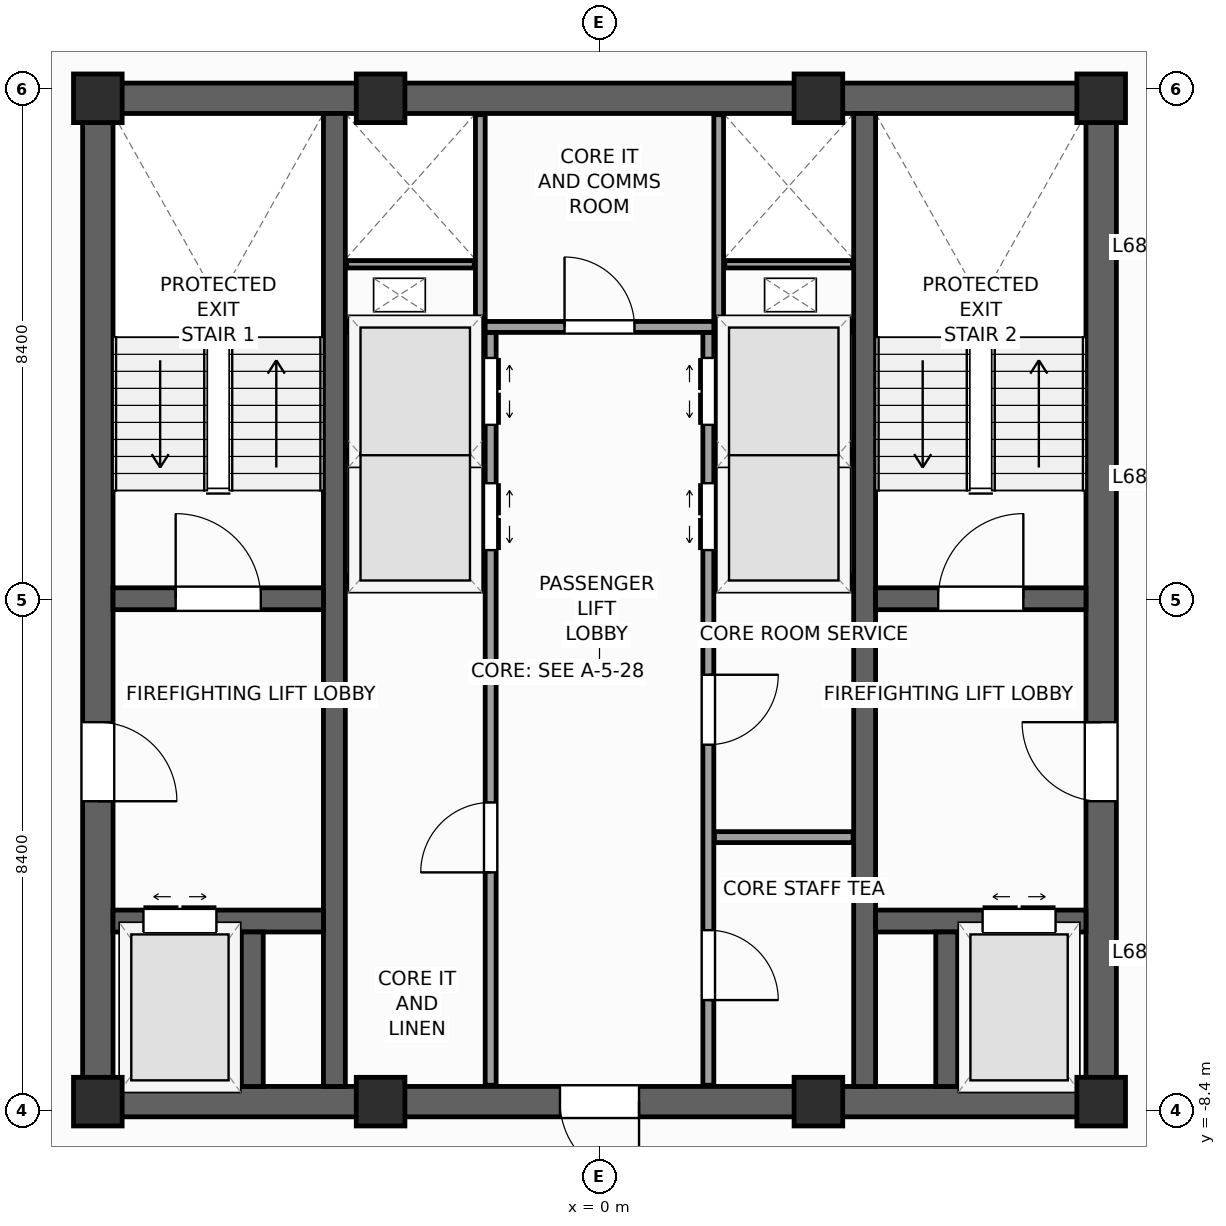
"""IFC4 building model, lengths in metres.
Left out: names, types, materials, properties, quantities, classifications, styles, units other than length and angle.
Written with IfcOpenShell. Run it as: python <this file> out.ifc"""

import sys

from ifc_helpers import new_model, si_unit, direction, frame, frame_2d, origin, origin_2d, place, context, subcontext, project, spatial, rectangle, extrude, source, transform, mapped, element, fill, save


model = new_model("IFC4")
c1 = context("Model", 3, precision=1e-05, world=origin(), true_north=direction((0.0, 1.0)))
c2 = subcontext(c1, "Body", "Model", "MODEL_VIEW")
j1 = project(units=[si_unit("LENGTHUNIT", "METRE"), si_unit("PLANEANGLEUNIT", "RADIAN")], contexts=[c1])
p1 = place(None, origin())
s1 = spatial("IfcSite", under=j1, at=p1, CompositionType="ELEMENT")
p2 = place(p1, origin())
s2 = spatial("IfcBuilding", under=s1, at=p2, CompositionType="ELEMENT")
p3 = place(p2, frame((0.0, 0.0, 279.6)))
s3 = spatial("IfcBuildingStorey", under=s2, at=p3, CompositionType="ELEMENT", Elevation=279.6)
p4 = place(p3, frame((-8.5, -8.25, 0.0), z_axis=(0.0, 0.0, 1.0), x_axis=(1.0, 0.0, 0.0)))
e1 = element("IfcWall", 1, at=p4, inside=s3, PredefinedType="SHEAR", context=c2, shape_type="SweptSolid", body=[
    extrude(rectangle(XDim=17.0, YDim=0.5, at=frame_2d((8.5, 0.0))), origin(), (0.0, 0.0, 1.0), 3.6),
])
p5 = place(p4, frame((7.85, 0.0, 0.0)))
e2 = element("IfcOpeningElement", 2, at=p5, cuts=e1, PredefinedType="OPENING", context=c2, shape_type="SweptSolid", body=[
    extrude(rectangle(XDim=1.3, YDim=2.2, at=frame_2d((0.65, 1.1))), frame((0.0, 0.26, 0.0), z_axis=(0.0, -1.0, 0.0), x_axis=(1.0, 0.0, 0.0)), (0.0, 0.0, 1.0), 0.52),
])
p6 = place(p3, frame((-8.5, 8.25, 0.0), z_axis=(0.0, 0.0, 1.0), x_axis=(1.0, 0.0, 0.0)))
e3 = element("IfcWall", 3, at=p6, inside=s3, PredefinedType="SHEAR", context=c2, shape_type="SweptSolid", body=[
    extrude(rectangle(XDim=17.0, YDim=0.5, at=frame_2d((8.5, 0.0))), origin(), (0.0, 0.0, 1.0), 3.6),
])
p7 = place(p3, frame((-8.25, -8.0, 0.0), z_axis=(0.0, 0.0, 1.0), x_axis=(0.0, 1.0, 0.0)))
e4 = element("IfcWall", 4, at=p7, inside=s3, PredefinedType="SHEAR", context=c2, shape_type="SweptSolid", body=[
    extrude(rectangle(XDim=16.0, YDim=0.5, at=frame_2d((8.0, 0.0))), origin(), (0.0, 0.0, 1.0), 3.6),
])
p8 = place(p7, frame((4.69, 0.0, 0.0)))
e5 = element("IfcOpeningElement", 5, at=p8, cuts=e4, PredefinedType="OPENING", context=c2, shape_type="SweptSolid", body=[
    extrude(rectangle(XDim=1.3, YDim=2.2, at=frame_2d((0.65, 1.1))), frame((0.0, 0.26, 0.0), z_axis=(0.0, -1.0, 0.0), x_axis=(1.0, 0.0, 0.0)), (0.0, 0.0, 1.0), 0.52),
])
p9 = place(p3, frame((8.25, -8.0, 0.0), z_axis=(0.0, 0.0, 1.0), x_axis=(0.0, 1.0, 0.0)))
e6 = element("IfcWall", 6, at=p9, inside=s3, PredefinedType="SHEAR", context=c2, shape_type="SweptSolid", body=[
    extrude(rectangle(XDim=16.0, YDim=0.5, at=frame_2d((8.0, 0.0))), origin(), (0.0, 0.0, 1.0), 3.6),
])
p10 = place(p9, frame((4.69, 0.0, 0.0)))
e7 = element("IfcOpeningElement", 7, at=p10, cuts=e6, PredefinedType="OPENING", context=c2, shape_type="SweptSolid", body=[
    extrude(rectangle(XDim=1.3, YDim=2.2, at=frame_2d((0.65, 1.1))), frame((0.0, 0.26, 0.0), z_axis=(0.0, -1.0, 0.0), x_axis=(1.0, 0.0, 0.0)), (0.0, 0.0, 1.0), 0.52),
])
for number, where, z_axis, x_axis in (
    (8, (-4.36, -8.0, 0.0), (0.0, 0.0, 1.0), (0.0, 1.0, 0.0)),
    (9, (4.36, -8.0, 0.0), (0.0, 0.0, 1.0), (0.0, 1.0, 0.0)),
):
    element("IfcWall", number, at=place(p3, frame(where, z_axis=z_axis, x_axis=x_axis)), inside=s3, PredefinedType="SHEAR", context=c2, shape_type="SweptSolid", body=[
        extrude(rectangle(XDim=16.0, YDim=0.36, at=frame_2d((8.0, 0.0))), origin(), (0.0, 0.0, 1.0), 3.6),
    ])
p11 = place(p3, frame((-8.0, 0.02, 0.0), z_axis=(0.0, 0.0, 1.0), x_axis=(1.0, 0.0, 0.0)))
e10 = element("IfcWall", 10, at=p11, inside=s3, PredefinedType="SHEAR", context=c2, shape_type="SweptSolid", body=[
    extrude(rectangle(XDim=3.46, YDim=0.36, at=frame_2d((1.73, 0.0))), origin(), (0.0, 0.0, 1.0), 3.6),
])
p12 = place(p11, frame((1.03, 0.0, 0.0)))
e11 = element("IfcOpeningElement", 11, at=p12, cuts=e10, PredefinedType="OPENING", context=c2, shape_type="SweptSolid", body=[
    extrude(rectangle(XDim=1.4, YDim=2.2, at=frame_2d((0.7, 1.1))), frame((0.0, 0.19, 0.0), z_axis=(0.0, -1.0, 0.0), x_axis=(1.0, 0.0, 0.0)), (0.0, 0.0, 1.0), 0.38),
])
p13 = place(p3, frame((4.54, 0.02, 0.0), z_axis=(0.0, 0.0, 1.0), x_axis=(1.0, 0.0, 0.0)))
e12 = element("IfcWall", 12, at=p13, inside=s3, PredefinedType="SHEAR", context=c2, shape_type="SweptSolid", body=[
    extrude(rectangle(XDim=3.46, YDim=0.36, at=frame_2d((1.73, 0.0))), origin(), (0.0, 0.0, 1.0), 3.6),
])
p14 = place(p13, frame((1.03, 0.0, 0.0)))
e13 = element("IfcOpeningElement", 13, at=p14, cuts=e12, PredefinedType="OPENING", context=c2, shape_type="SweptSolid", body=[
    extrude(rectangle(XDim=1.4, YDim=2.2, at=frame_2d((0.7, 1.1))), frame((0.0, 0.19, 0.0), z_axis=(0.0, -1.0, 0.0), x_axis=(1.0, 0.0, 0.0)), (0.0, 0.0, 1.0), 0.38),
])
p15 = place(p3, frame((-8.0, -5.28, 0.0), z_axis=(0.0, 0.0, 1.0), x_axis=(1.0, 0.0, 0.0)))
e14 = element("IfcWall", 14, at=p15, inside=s3, PredefinedType="SHEAR", context=c2, shape_type="SweptSolid", body=[
    extrude(rectangle(XDim=3.46, YDim=0.36, at=frame_2d((1.73, 0.0))), origin(), (0.0, 0.0, 1.0), 3.6),
])
p16 = place(p15, frame((0.5, 0.0, 0.0)))
e15 = element("IfcOpeningElement", 15, at=p16, cuts=e14, PredefinedType="OPENING", context=c2, shape_type="SweptSolid", body=[
    extrude(rectangle(XDim=1.2, YDim=2.25, at=frame_2d((0.6, 1.125))), frame((0.0, 0.19, 0.0), z_axis=(0.0, -1.0, 0.0), x_axis=(1.0, 0.0, 0.0)), (0.0, 0.0, 1.0), 0.38),
])
p17 = place(p3, frame((4.54, -5.28, 0.0), z_axis=(0.0, 0.0, 1.0), x_axis=(1.0, 0.0, 0.0)))
e16 = element("IfcWall", 16, at=p17, inside=s3, PredefinedType="SHEAR", context=c2, shape_type="SweptSolid", body=[
    extrude(rectangle(XDim=3.46, YDim=0.36, at=frame_2d((1.73, 0.0))), origin(), (0.0, 0.0, 1.0), 3.6),
])
p18 = place(p17, frame((1.76, 0.0, 0.0)))
e17 = element("IfcOpeningElement", 17, at=p18, cuts=e16, PredefinedType="OPENING", context=c2, shape_type="SweptSolid", body=[
    extrude(rectangle(XDim=1.2, YDim=2.25, at=frame_2d((0.6, 1.125))), frame((0.0, 0.19, 0.0), z_axis=(0.0, -1.0, 0.0), x_axis=(1.0, 0.0, 0.0)), (0.0, 0.0, 1.0), 0.38),
])
for number, where, z_axis, x_axis in (
    (18, (-5.71, -8.0, 0.0), (0.0, 0.0, 1.0), (0.0, 1.0, 0.0)),
    (19, (5.71, -8.0, 0.0), (0.0, 0.0, 1.0), (0.0, 1.0, 0.0)),
):
    element("IfcWall", number, at=place(p3, frame(where, z_axis=z_axis, x_axis=x_axis)), inside=s3, PredefinedType="SHEAR", context=c2, shape_type="SweptSolid", body=[
        extrude(rectangle(XDim=2.54, YDim=0.36, at=frame_2d((1.27, 0.0))), origin(), (0.0, 0.0, 1.0), 3.6),
    ])
m1 = source(origin(), c2, "Body", "SweptSolid", [
    extrude(rectangle(XDim=0.8, YDim=0.8, at=origin_2d()), origin(), (0.0, 0.0, 1.0), 3.6),
])
for number, where, z_axis, x_axis in (
    (20, (-8.25, -8.25, 0.0), (0.0, 0.0, 1.0), (1.0, 0.0, 0.0)),
    (21, (8.25, -8.25, 0.0), (0.0, 0.0, 1.0), (1.0, 0.0, 0.0)),
    (22, (8.25, 8.25, 0.0), (0.0, 0.0, 1.0), (1.0, 0.0, 0.0)),
    (23, (-8.25, 8.25, 0.0), (0.0, 0.0, 1.0), (1.0, 0.0, 0.0)),
    (24, (-3.6, -8.25, 0.0), (0.0, 0.0, 1.0), (1.0, 0.0, 0.0)),
    (25, (3.6, -8.25, 0.0), (0.0, 0.0, 1.0), (1.0, 0.0, 0.0)),
    (26, (-3.6, 8.25, 0.0), (0.0, 0.0, 1.0), (1.0, 0.0, 0.0)),
    (27, (3.6, 8.25, 0.0), (0.0, 0.0, 1.0), (1.0, 0.0, 0.0)),
):
    element("IfcColumn", number, at=place(p3, frame(where, z_axis=z_axis, x_axis=x_axis)), inside=s3, PredefinedType="PILASTER", context=c2, shape_type="MappedRepresentation", body=[
        mapped(m1, transform((0.0, 0.0, 0.0), scale=1.0)),
    ])
p19 = place(p3, frame((-1.79, -7.98, 0.0), z_axis=(0.0, 0.0, 1.0), x_axis=(0.0, 1.0, 0.0)))
e28 = element("IfcWall", 28, at=p19, inside=s3, PredefinedType="PARTITIONING", context=c2, shape_type="SweptSolid", body=[
    extrude(rectangle(XDim=12.38, YDim=0.18, at=frame_2d((6.19, 0.0))), origin(), (0.0, 0.0, 1.0), 3.35),
])
p20 = place(p19, frame((8.8, 0.0, 0.0)))
e29 = element("IfcOpeningElement", 29, at=p20, cuts=e28, PredefinedType="OPENING", context=c2, shape_type="SweptSolid", body=[
    extrude(rectangle(XDim=1.1, YDim=2.2, at=frame_2d((0.55, 1.1))), frame((0.0, 0.1, 0.0), z_axis=(0.0, -1.0, 0.0), x_axis=(1.0, 0.0, 0.0)), (0.0, 0.0, 1.0), 0.2),
])
p21 = place(p19, frame((10.86, 0.0, 0.0)))
e30 = element("IfcOpeningElement", 30, at=p21, cuts=e28, PredefinedType="OPENING", context=c2, shape_type="SweptSolid", body=[
    extrude(rectangle(XDim=1.1, YDim=2.2, at=frame_2d((0.55, 1.1))), frame((0.0, 0.1, 0.0), z_axis=(0.0, -1.0, 0.0), x_axis=(1.0, 0.0, 0.0)), (0.0, 0.0, 1.0), 0.2),
])
p22 = place(p19, frame((3.5, 0.0, 0.0)))
e31 = element("IfcOpeningElement", 31, at=p22, cuts=e28, PredefinedType="OPENING", context=c2, shape_type="SweptSolid", body=[
    extrude(rectangle(XDim=1.15, YDim=2.25, at=frame_2d((0.575, 1.125))), frame((0.0, 0.1, 0.0), z_axis=(0.0, -1.0, 0.0), x_axis=(1.0, 0.0, 0.0)), (0.0, 0.0, 1.0), 0.2),
])
p23 = place(p3, frame((1.79, -7.98, 0.0), z_axis=(0.0, 0.0, 1.0), x_axis=(0.0, 1.0, 0.0)))
e32 = element("IfcWall", 32, at=p23, inside=s3, PredefinedType="PARTITIONING", context=c2, shape_type="SweptSolid", body=[
    extrude(rectangle(XDim=12.38, YDim=0.18, at=frame_2d((6.19, 0.0))), origin(), (0.0, 0.0, 1.0), 3.35),
])
p24 = place(p23, frame((8.8, 0.0, 0.0)))
e33 = element("IfcOpeningElement", 33, at=p24, cuts=e32, PredefinedType="OPENING", context=c2, shape_type="SweptSolid", body=[
    extrude(rectangle(XDim=1.1, YDim=2.2, at=frame_2d((0.55, 1.1))), frame((0.0, 0.1, 0.0), z_axis=(0.0, -1.0, 0.0), x_axis=(1.0, 0.0, 0.0)), (0.0, 0.0, 1.0), 0.2),
])
p25 = place(p23, frame((10.86, 0.0, 0.0)))
e34 = element("IfcOpeningElement", 34, at=p25, cuts=e32, PredefinedType="OPENING", context=c2, shape_type="SweptSolid", body=[
    extrude(rectangle(XDim=1.1, YDim=2.2, at=frame_2d((0.55, 1.1))), frame((0.0, 0.1, 0.0), z_axis=(0.0, -1.0, 0.0), x_axis=(1.0, 0.0, 0.0)), (0.0, 0.0, 1.0), 0.2),
])
p26 = place(p23, frame((1.4, 0.0, 0.0)))
e35 = element("IfcOpeningElement", 35, at=p26, cuts=e32, PredefinedType="OPENING", context=c2, shape_type="SweptSolid", body=[
    extrude(rectangle(XDim=1.15, YDim=2.25, at=frame_2d((0.575, 1.125))), frame((0.0, 0.1, 0.0), z_axis=(0.0, -1.0, 0.0), x_axis=(1.0, 0.0, 0.0)), (0.0, 0.0, 1.0), 0.2),
])
p27 = place(p23, frame((5.6, 0.0, 0.0)))
e36 = element("IfcOpeningElement", 36, at=p27, cuts=e32, PredefinedType="OPENING", context=c2, shape_type="SweptSolid", body=[
    extrude(rectangle(XDim=1.15, YDim=2.25, at=frame_2d((0.575, 1.125))), frame((0.0, 0.1, 0.0), z_axis=(0.0, -1.0, 0.0), x_axis=(1.0, 0.0, 0.0)), (0.0, 0.0, 1.0), 0.2),
])
p28 = place(p3, frame((-1.88, 4.49, 0.0), z_axis=(0.0, 0.0, 1.0), x_axis=(1.0, 0.0, 0.0)))
e37 = element("IfcWall", 37, at=p28, inside=s3, PredefinedType="PARTITIONING", context=c2, shape_type="SweptSolid", body=[
    extrude(rectangle(XDim=3.76, YDim=0.18, at=frame_2d((1.88, 0.0))), origin(), (0.0, 0.0, 1.0), 3.35),
])
p29 = place(p28, frame((1.305, 0.0, 0.0)))
e38 = element("IfcOpeningElement", 38, at=p29, cuts=e37, PredefinedType="OPENING", context=c2, shape_type="SweptSolid", body=[
    extrude(rectangle(XDim=1.15, YDim=2.25, at=frame_2d((0.575, 1.125))), frame((0.0, 0.1, 0.0), z_axis=(0.0, -1.0, 0.0), x_axis=(1.0, 0.0, 0.0)), (0.0, 0.0, 1.0), 0.2),
])
for number, where, z_axis, x_axis in (
    (39, (1.89, -3.9, 0.0), (0.0, 0.0, 1.0), (1.0, 0.0, 0.0)),
    (40, (-4.17, 0.3, 0.0), (0.0, 0.0, 1.0), (1.0, 0.0, 0.0)),
    (41, (1.89, 0.3, 0.0), (0.0, 0.0, 1.0), (1.0, 0.0, 0.0)),
    (42, (-4.17, 4.49, 0.0), (0.0, 0.0, 1.0), (1.0, 0.0, 0.0)),
    (43, (1.89, 4.49, 0.0), (0.0, 0.0, 1.0), (1.0, 0.0, 0.0)),
):
    element("IfcWall", number, at=place(p3, frame(where, z_axis=z_axis, x_axis=x_axis)), inside=s3, PredefinedType="PARTITIONING", context=c2, shape_type="SweptSolid", body=[
        extrude(rectangle(XDim=2.28, YDim=0.18, at=frame_2d((1.14, 0.0))), origin(), (0.0, 0.0, 1.0), 3.35),
    ])
for number, where, z_axis, x_axis in (
    (44, (-4.16, 2.4, 0.0), (0.0, 0.0, 1.0), (1.0, 0.0, 0.0)),
    (45, (1.9, 2.4, 0.0), (0.0, 0.0, 1.0), (1.0, 0.0, 0.0)),
):
    element("IfcWall", number, at=place(p3, frame(where, z_axis=z_axis, x_axis=x_axis)), inside=s3, PredefinedType="PARTITIONING", context=c2, shape_type="SweptSolid", body=[
        extrude(rectangle(XDim=2.26, YDim=0.12, at=frame_2d((1.13, 0.0))), origin(), (0.0, 0.0, 1.0), 3.35),
    ])
for number, where, z_axis, x_axis in (
    (46, (-1.96, 4.58, 0.0), (0.0, 0.0, 1.0), (0.0, 1.0, 0.0)),
    (47, (1.96, 4.58, 0.0), (0.0, 0.0, 1.0), (0.0, 1.0, 0.0)),
):
    element("IfcWall", number, at=place(p3, frame(where, z_axis=z_axis, x_axis=x_axis)), inside=s3, PredefinedType="PARTITIONING", context=c2, shape_type="SweptSolid", body=[
        extrude(rectangle(XDim=3.4, YDim=0.16, at=frame_2d((1.7, 0.0))), origin(), (0.0, 0.0, 1.0), 3.35),
    ])
for number, where, z_axis, x_axis in (
    (48, (-4.16, 5.52, 0.0), (0.0, 0.0, 1.0), (1.0, 0.0, 0.0)),
    (49, (2.06, 5.52, 0.0), (0.0, 0.0, 1.0), (1.0, 0.0, 0.0)),
):
    element("IfcWall", number, at=place(p3, frame(where, z_axis=z_axis, x_axis=x_axis)), inside=s3, PredefinedType="PARTITIONING", context=c2, shape_type="SweptSolid", body=[
        extrude(rectangle(XDim=2.1, YDim=0.12, at=frame_2d((1.05, 0.0))), origin(), (0.0, 0.0, 1.0), 3.35),
    ])
m2 = source(origin(), c2, "Body", "SweptSolid", [
    extrude(rectangle(XDim=1.4, YDim=2.2, at=frame_2d((0.7, 1.1))), frame((0.0, 0.025, 0.0), z_axis=(0.0, -1.0, 0.0), x_axis=(1.0, 0.0, 0.0)), (0.0, 0.0, 1.0), 0.05),
])
p30 = place(p12, origin())
e50 = element("IfcDoor", 50, at=p30, inside=s3, OperationType="SINGLE_SWING_LEFT", PredefinedType="DOOR", context=c2, shape_type="MappedRepresentation", body=[
    mapped(m2, transform((0.0, 0.0, 0.0), scale=1.0)),
])
fill(e11, e50)
p31 = place(p14, origin())
e51 = element("IfcDoor", 51, at=p31, inside=s3, OperationType="SINGLE_SWING_RIGHT", PredefinedType="DOOR", context=c2, shape_type="MappedRepresentation", body=[
    mapped(m2, transform((0.0, 0.0, 0.0), scale=1.0)),
])
fill(e13, e51)
m3 = source(origin(), c2, "Body", "SweptSolid", [
    extrude(rectangle(XDim=1.3, YDim=2.2, at=frame_2d((0.65, 1.1))), frame((0.0, 0.025, 0.0), z_axis=(0.0, -1.0, 0.0), x_axis=(1.0, 0.0, 0.0)), (0.0, 0.0, 1.0), 0.05),
])
p32 = place(p8, frame((1.3, 0.0, 0.0), z_axis=(0.0, 0.0, 1.0), x_axis=(-1.0, 0.0, 0.0)))
e52 = element("IfcDoor", 52, at=p32, inside=s3, OperationType="SINGLE_SWING_LEFT", PredefinedType="DOOR", context=c2, shape_type="MappedRepresentation", body=[
    mapped(m3, transform((0.0, 0.0, 0.0), scale=1.0)),
])
fill(e5, e52)
p33 = place(p10, origin())
e53 = element("IfcDoor", 53, at=p33, inside=s3, OperationType="SINGLE_SWING_RIGHT", PredefinedType="DOOR", context=c2, shape_type="MappedRepresentation", body=[
    mapped(m3, transform((0.0, 0.0, 0.0), scale=1.0)),
])
fill(e7, e53)
p34 = place(p5, frame((1.3, 0.0, 0.0), z_axis=(0.0, 0.0, 1.0), x_axis=(-1.0, 0.0, 0.0)))
e54 = element("IfcDoor", 54, at=p34, inside=s3, OperationType="SINGLE_SWING_RIGHT", PredefinedType="DOOR", context=c2, shape_type="MappedRepresentation", body=[
    mapped(m3, transform((0.0, 0.0, 0.0), scale=1.0)),
])
fill(e2, e54)
m4 = source(origin(), c2, "Body", "SweptSolid", [
    extrude(rectangle(XDim=1.2, YDim=2.25, at=frame_2d((0.6, 1.125))), frame((0.0, 0.025, 0.0), z_axis=(0.0, -1.0, 0.0), x_axis=(1.0, 0.0, 0.0)), (0.0, 0.0, 1.0), 0.05),
])
p35 = place(p16, origin())
e55 = element("IfcDoor", 55, at=p35, inside=s3, OperationType="DOUBLE_DOOR_SLIDING", PredefinedType="DOOR", context=c2, shape_type="MappedRepresentation", body=[
    mapped(m4, transform((0.0, 0.0, 0.0), scale=1.0)),
])
fill(e15, e55)
p36 = place(p18, origin())
e56 = element("IfcDoor", 56, at=p36, inside=s3, OperationType="DOUBLE_DOOR_SLIDING", PredefinedType="DOOR", context=c2, shape_type="MappedRepresentation", body=[
    mapped(m4, transform((0.0, 0.0, 0.0), scale=1.0)),
])
fill(e17, e56)
m5 = source(origin(), c2, "Body", "SweptSolid", [
    extrude(rectangle(XDim=1.1, YDim=2.2, at=frame_2d((0.55, 1.1))), frame((0.0, 0.025, 0.0), z_axis=(0.0, -1.0, 0.0), x_axis=(1.0, 0.0, 0.0)), (0.0, 0.0, 1.0), 0.05),
])
p37 = place(p20, frame((1.1, 0.0, 0.0), z_axis=(0.0, 0.0, 1.0), x_axis=(-1.0, 0.0, 0.0)))
e57 = element("IfcDoor", 57, at=p37, inside=s3, OperationType="DOUBLE_DOOR_SLIDING", PredefinedType="DOOR", context=c2, shape_type="MappedRepresentation", body=[
    mapped(m5, transform((0.0, 0.0, 0.0), scale=1.0)),
])
fill(e29, e57)
p38 = place(p21, frame((1.1, 0.0, 0.0), z_axis=(0.0, 0.0, 1.0), x_axis=(-1.0, 0.0, 0.0)))
e58 = element("IfcDoor", 58, at=p38, inside=s3, OperationType="DOUBLE_DOOR_SLIDING", PredefinedType="DOOR", context=c2, shape_type="MappedRepresentation", body=[
    mapped(m5, transform((0.0, 0.0, 0.0), scale=1.0)),
])
fill(e30, e58)
p39 = place(p24, origin())
e59 = element("IfcDoor", 59, at=p39, inside=s3, OperationType="DOUBLE_DOOR_SLIDING", PredefinedType="DOOR", context=c2, shape_type="MappedRepresentation", body=[
    mapped(m5, transform((0.0, 0.0, 0.0), scale=1.0)),
])
fill(e33, e59)
p40 = place(p25, origin())
e60 = element("IfcDoor", 60, at=p40, inside=s3, OperationType="DOUBLE_DOOR_SLIDING", PredefinedType="DOOR", context=c2, shape_type="MappedRepresentation", body=[
    mapped(m5, transform((0.0, 0.0, 0.0), scale=1.0)),
])
fill(e34, e60)
m6 = source(origin(), c2, "Body", "SweptSolid", [
    extrude(rectangle(XDim=1.15, YDim=2.25, at=frame_2d((0.575, 1.125))), frame((0.0, 0.025, 0.0), z_axis=(0.0, -1.0, 0.0), x_axis=(1.0, 0.0, 0.0)), (0.0, 0.0, 1.0), 0.05),
])
p41 = place(p22, origin())
e61 = element("IfcDoor", 61, at=p41, inside=s3, OperationType="SINGLE_SWING_LEFT", PredefinedType="DOOR", context=c2, shape_type="MappedRepresentation", body=[
    mapped(m6, transform((0.0, 0.0, 0.0), scale=1.0)),
])
fill(e31, e61)
p42 = place(p26, frame((1.15, 0.0, 0.0), z_axis=(0.0, 0.0, 1.0), x_axis=(-1.0, 0.0, 0.0)))
e62 = element("IfcDoor", 62, at=p42, inside=s3, OperationType="SINGLE_SWING_LEFT", PredefinedType="DOOR", context=c2, shape_type="MappedRepresentation", body=[
    mapped(m6, transform((0.0, 0.0, 0.0), scale=1.0)),
])
fill(e35, e62)
p43 = place(p27, frame((1.15, 0.0, 0.0), z_axis=(0.0, 0.0, 1.0), x_axis=(-1.0, 0.0, 0.0)))
e63 = element("IfcDoor", 63, at=p43, inside=s3, OperationType="SINGLE_SWING_RIGHT", PredefinedType="DOOR", context=c2, shape_type="MappedRepresentation", body=[
    mapped(m6, transform((0.0, 0.0, 0.0), scale=1.0)),
])
fill(e36, e63)
p44 = place(p29, origin())
e64 = element("IfcDoor", 64, at=p44, inside=s3, OperationType="SINGLE_SWING_LEFT", PredefinedType="DOOR", context=c2, shape_type="MappedRepresentation", body=[
    mapped(m6, transform((0.0, 0.0, 0.0), scale=1.0)),
])
fill(e38, e64)
save(model, sys.argv[1])
